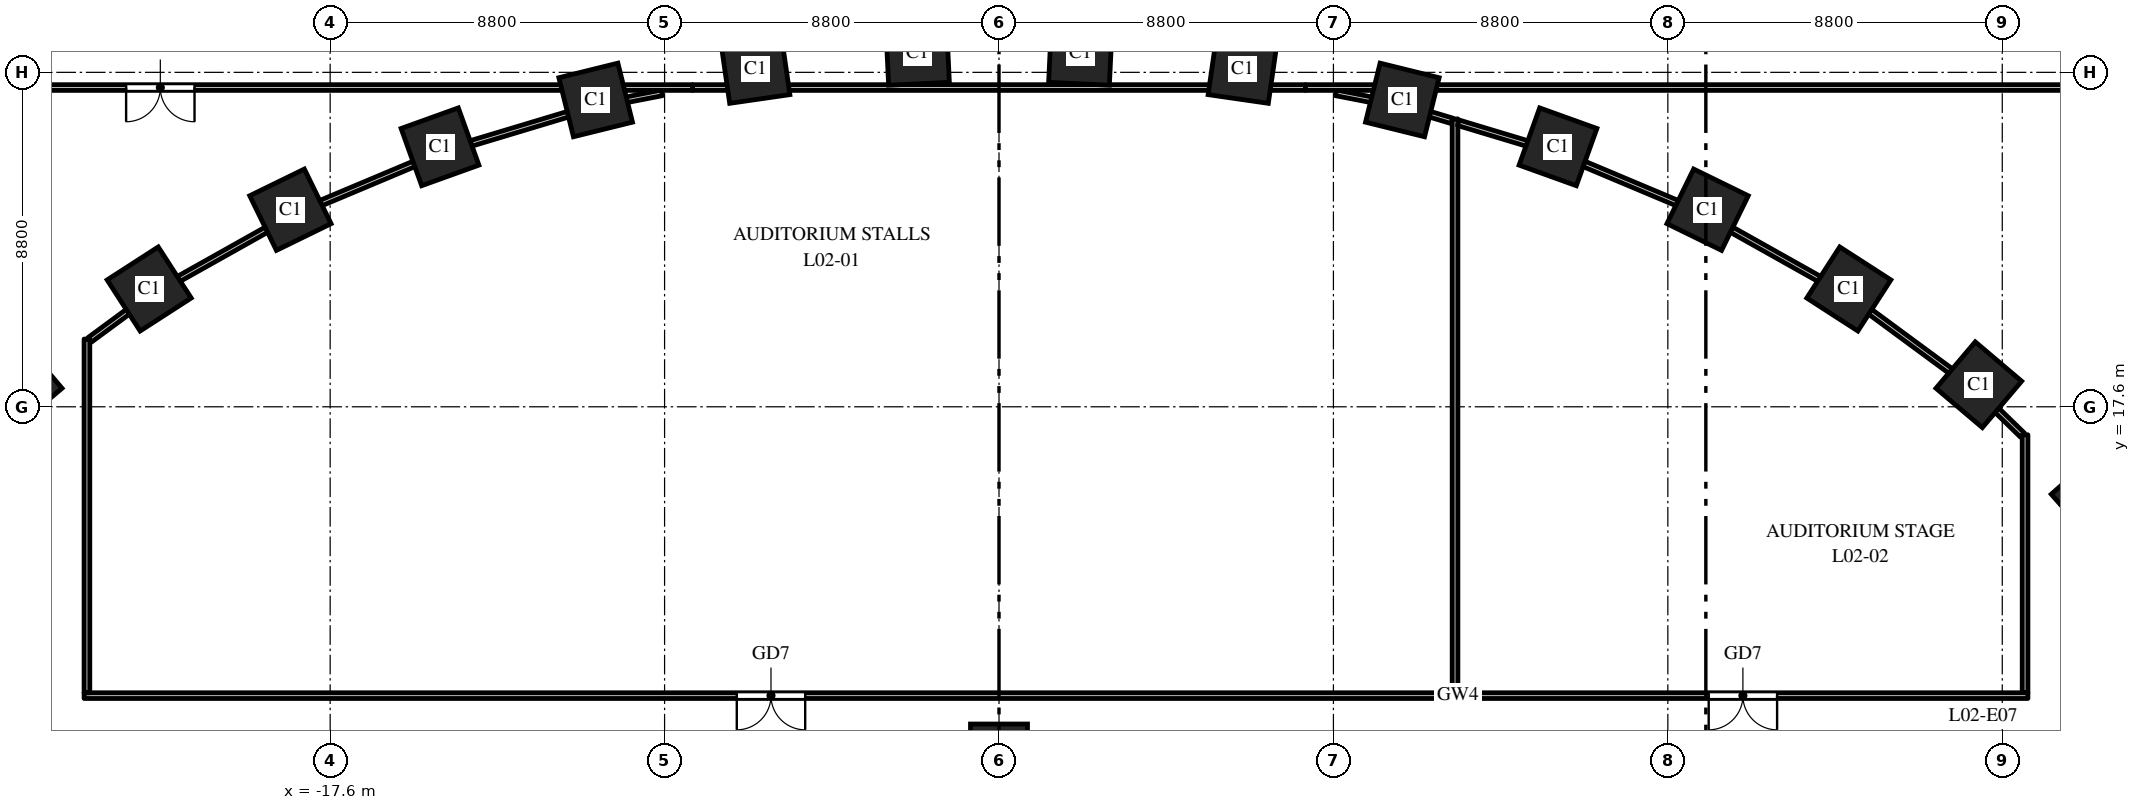
"""IFC4 building model, lengths in metres.
Left out: names, types, materials, properties, quantities, classifications, styles, units other than length and angle.
Written with IfcOpenShell. Run it as: python <this file> out.ifc"""

import sys

from ifc_helpers import new_model, si_unit, direction, frame, frame_2d, origin, origin_2d, place, context, subcontext, project, spatial, rectangle, extrude, element, fill, save


model = new_model("IFC4")
c1 = context("Model", 3, precision=1e-05, world=origin(), true_north=direction((0.0, 1.0)))
c2 = subcontext(c1, "Body", "Model", "MODEL_VIEW")
j1 = project(units=[si_unit("LENGTHUNIT", "METRE"), si_unit("PLANEANGLEUNIT", "RADIAN")], contexts=[c1])
p1 = place(None, origin())
s1 = spatial("IfcSite", under=j1, at=p1, CompositionType="ELEMENT")
p2 = place(p1, origin())
s2 = spatial("IfcBuilding", under=s1, at=p2, CompositionType="ELEMENT")
p3 = place(p2, frame((0.0, 0.0, 13.5)))
s3 = spatial("IfcBuildingStorey", under=s2, at=p3, CompositionType="ELEMENT", Elevation=13.5)
for number, where, z_axis, x_axis in (
    (1, (28.819, 15.23, 0.0), (0.0, 0.0, 1.0), (-0.663, 0.749, 0.0)),
    (2, (25.783, 18.18, 0.0), (0.0, 0.0, 1.0), (-0.763, 0.646, 0.0)),
    (3, (22.362, 20.7, 0.0), (0.0, 0.0, 1.0), (-0.84, 0.542, 0.0)),
    (4, (18.646, 22.785, 0.0), (0.0, 0.0, 1.0), (-0.898, 0.439, 0.0)),
    (5, (14.709, 24.441, 0.0), (0.0, 0.0, 1.0), (-0.941, 0.338, 0.0)),
    (6, (10.613, 25.674, 0.0), (0.0, 0.0, 1.0), (-0.971, 0.24, 0.0)),
    (7, (6.409, 26.491, 0.0), (0.0, 0.0, 1.0), (-0.99, 0.143, 0.0)),
    (8, (2.143, 26.898, 0.0), (0.0, 0.0, 1.0), (-0.999, 0.048, 0.0)),
    (9, (-2.143, 26.898, 0.0), (0.0, 0.0, 1.0), (-0.999, -0.048, 0.0)),
    (10, (-6.409, 26.491, 0.0), (0.0, 0.0, 1.0), (-0.99, -0.143, 0.0)),
    (11, (-10.613, 25.674, 0.0), (0.0, 0.0, 1.0), (-0.971, -0.24, 0.0)),
    (12, (-14.709, 24.441, 0.0), (0.0, 0.0, 1.0), (-0.941, -0.338, 0.0)),
    (13, (-18.646, 22.785, 0.0), (0.0, 0.0, 1.0), (-0.898, -0.439, 0.0)),
    (14, (-22.362, 20.7, 0.0), (0.0, 0.0, 1.0), (-0.84, -0.542, 0.0)),
    (15, (-25.783, 18.18, 0.0), (0.0, 0.0, 1.0), (-0.763, -0.646, 0.0)),
):
    element("IfcColumn", number, at=place(p3, frame(where, z_axis=z_axis, x_axis=x_axis)), inside=s3, PredefinedType="COLUMN", context=c2, shape_type="SweptSolid", body=[
        extrude(rectangle(XDim=1.6, YDim=1.6, at=origin_2d()), origin(), (0.0, 0.0, 1.0), 6.0),
    ])
p4 = place(p3, frame((0.0, 8.503, 0.0), z_axis=(0.0, 0.0, 1.0), x_axis=(-1.0, 0.0, 0.0)))
e16 = element("IfcColumn", 16, at=p4, inside=s3, PredefinedType="COLUMN", context=c2, shape_type="SweptSolid", body=[
    extrude(rectangle(XDim=1.5, YDim=1.5, at=origin_2d()), origin(), (0.0, 0.0, 1.0), 6.0),
])
p5 = place(p3, frame((12.0, 25.175, 0.0), z_axis=(0.0, 0.0, 1.0), x_axis=(0.0, -1.0, 0.0)))
e17 = element("IfcWall", 17, at=p5, inside=s3, PredefinedType="PARTITIONING", context=c2, shape_type="SweptSolid", body=[
    extrude(rectangle(XDim=15.1, YDim=0.15, at=frame_2d((7.55, 0.0))), origin(), (0.0, 0.0, 1.0), 4.8),
])
p6 = place(p3, frame((-8.064, 26.0, 0.0), z_axis=(0.0, 0.0, 1.0), x_axis=(1.0, 0.0, 0.0)))
e18 = element("IfcWall", 18, at=p6, inside=s3, PredefinedType="PARTITIONING", context=c2, shape_type="SweptSolid", body=[
    extrude(rectangle(XDim=16.129, YDim=0.15, at=frame_2d((8.064, 0.0))), origin(), (0.0, 0.0, 1.0), 4.8),
])
p7 = place(p3, frame((-23.927, 19.361, 0.0), z_axis=(0.0, 0.0, 1.0), x_axis=(0.805121312462, 0.593110168703, 0.0)))
e19 = element("IfcWall", 19, at=p7, inside=s3, PredefinedType="PARTITIONING", context=c2, shape_type="SweptSolid", body=[
    extrude(rectangle(XDim=1.968, YDim=0.15, at=frame_2d((0.984, 0.0))), origin(), (0.0, 0.0, 1.0), 4.85),
])
p8 = place(p3, frame((-22.346, 20.537, 0.0), z_axis=(0.0, 0.0, 1.0), x_axis=(0.872066959566, 0.489386573204, 0.0)))
e20 = element("IfcWall", 20, at=p8, inside=s3, PredefinedType="PARTITIONING", context=c2, shape_type="SweptSolid", body=[
    extrude(rectangle(XDim=4.242, YDim=0.15, at=frame_2d((2.121, 0.0))), origin(), (0.0, 0.0, 1.0), 4.85),
])
p9 = place(p3, frame((-18.649, 22.621, 0.0), z_axis=(0.0, 0.0, 1.0), x_axis=(0.921813560734, 0.387633537309, 0.0)))
e21 = element("IfcWall", 21, at=p9, inside=s3, PredefinedType="PARTITIONING", context=c2, shape_type="SweptSolid", body=[
    extrude(rectangle(XDim=4.253, YDim=0.15, at=frame_2d((2.126, 0.0))), origin(), (0.0, 0.0, 1.0), 4.85),
])
p10 = place(p3, frame((-14.73, 24.278, 0.0), z_axis=(0.0, 0.0, 1.0), x_axis=(0.957579221601, 0.288170148278, 0.0)))
e22 = element("IfcWall", 22, at=p10, inside=s3, PredefinedType="PARTITIONING", context=c2, shape_type="SweptSolid", body=[
    extrude(rectangle(XDim=4.412, YDim=0.15, at=frame_2d((2.206, 0.0))), origin(), (0.0, 0.0, 1.0), 4.85),
])
p11 = place(p3, frame((-10.503, 25.542, 0.0), z_axis=(0.0, 0.0, 1.0), x_axis=(0.981604703618, 0.190924607725, 0.0)))
e23 = element("IfcWall", 23, at=p11, inside=s3, PredefinedType="PARTITIONING", context=c2, shape_type="SweptSolid", body=[
    extrude(rectangle(XDim=1.665, YDim=0.15, at=frame_2d((0.833, 0.0))), origin(), (0.0, 0.0, 1.0), 4.85),
])
p12 = place(p3, frame((8.868, 25.86, 0.0), z_axis=(0.0, 0.0, 1.0), x_axis=(0.981606292059, -0.190916440861, 0.0)))
e24 = element("IfcWall", 24, at=p12, inside=s3, PredefinedType="PARTITIONING", context=c2, shape_type="SweptSolid", body=[
    extrude(rectangle(XDim=1.816, YDim=0.15, at=frame_2d((0.908, 0.0))), origin(), (0.0, 0.0, 1.0), 4.85),
])
p13 = place(p3, frame((10.65, 25.506, 0.0), z_axis=(0.0, 0.0, 1.0), x_axis=(0.957547353506, -0.28827602362, 0.0)))
e25 = element("IfcWall", 25, at=p13, inside=s3, PredefinedType="PARTITIONING", context=c2, shape_type="SweptSolid", body=[
    extrude(rectangle(XDim=1.327, YDim=0.15, at=frame_2d((0.664, 0.0))), origin(), (0.0, 0.0, 1.0), 4.85),
])
p14 = place(p3, frame((12.075, 10.0, 0.0), z_axis=(0.0, 0.0, 1.0), x_axis=(-1.0, 0.0, 0.0)))
e26 = element("IfcWall", 26, at=p14, inside=s3, PredefinedType="PARTITIONING", context=c2, shape_type="SweptSolid", body=[
    extrude(rectangle(XDim=36.15, YDim=0.15, at=frame_2d((18.075, 0.0))), origin(), (0.0, 0.0, 1.0), 4.7),
])
p15 = place(p14, frame((17.175, 0.0, 0.0)))
e27 = element("IfcOpeningElement", 27, at=p15, cuts=e26, PredefinedType="OPENING", context=c2, shape_type="SweptSolid", body=[
    extrude(rectangle(XDim=1.8, YDim=2.4, at=frame_2d((0.9, 1.2))), frame((0.0, 0.085, 0.0), z_axis=(0.0, -1.0, 0.0), x_axis=(1.0, 0.0, 0.0)), (0.0, 0.0, 1.0), 0.17),
])
p16 = place(p3, frame((-24.0, 10.075, 0.0), z_axis=(0.0, 0.0, 1.0), x_axis=(0.0, 1.0, 0.0)))
e28 = element("IfcWall", 28, at=p16, inside=s3, PredefinedType="PARTITIONING", context=c2, shape_type="SweptSolid", body=[
    extrude(rectangle(XDim=9.307, YDim=0.15, at=frame_2d((4.654, 0.0))), origin(), (0.0, 0.0, 1.0), 4.7),
])
p17 = place(p3, frame((12.086, 25.074, 0.0), z_axis=(0.0, 0.0, 1.0), x_axis=(0.957560758584, -0.28823149311, 0.0)))
e29 = element("IfcWall", 29, at=p17, inside=s3, PredefinedType="PARTITIONING", context=c2, shape_type="SweptSolid", body=[
    extrude(rectangle(XDim=2.611, YDim=0.15, at=frame_2d((1.305, 0.0))), origin(), (0.0, 0.0, 1.0), 4.85),
])
p18 = place(p3, frame((14.59, 24.329, 0.0), z_axis=(0.0, 0.0, 1.0), x_axis=(0.921807455064, -0.387648056604, 0.0)))
e30 = element("IfcWall", 30, at=p18, inside=s3, PredefinedType="PARTITIONING", context=c2, shape_type="SweptSolid", body=[
    extrude(rectangle(XDim=4.404, YDim=0.15, at=frame_2d((2.202, 0.0))), origin(), (0.0, 0.0, 1.0), 4.85),
])
p19 = place(p3, frame((18.647, 22.613, 0.0), z_axis=(0.0, 0.0, 1.0), x_axis=(0.872066959566, -0.489386573204, 0.0)))
e31 = element("IfcWall", 31, at=p19, inside=s3, PredefinedType="PARTITIONING", context=c2, shape_type="SweptSolid", body=[
    extrude(rectangle(XDim=4.242, YDim=0.15, at=frame_2d((2.121, 0.0))), origin(), (0.0, 0.0, 1.0), 4.85),
])
p20 = place(p3, frame((22.342, 20.528, 0.0), z_axis=(0.0, 0.0, 1.0), x_axis=(0.80511970197, -0.59311235487, 0.0)))
e32 = element("IfcWall", 32, at=p20, inside=s3, PredefinedType="PARTITIONING", context=c2, shape_type="SweptSolid", body=[
    extrude(rectangle(XDim=4.227, YDim=0.15, at=frame_2d((2.114, 0.0))), origin(), (0.0, 0.0, 1.0), 4.85),
])
p21 = place(p3, frame((25.741, 18.012, 0.0), z_axis=(0.0, 0.0, 1.0), x_axis=(0.717304526637, -0.696759797969, 0.0)))
e33 = element("IfcWall", 33, at=p21, inside=s3, PredefinedType="PARTITIONING", context=c2, shape_type="SweptSolid", body=[
    extrude(rectangle(XDim=1.664, YDim=0.15, at=frame_2d((0.832, 0.0))), origin(), (0.0, 0.0, 1.0), 4.85),
])
p22 = place(p3, frame((27.0, 16.864, 0.0), z_axis=(0.0, 0.0, 1.0), x_axis=(0.0, -1.0, 0.0)))
e34 = element("IfcWall", 34, at=p22, inside=s3, PredefinedType="PARTITIONING", context=c2, shape_type="SweptSolid", body=[
    extrude(rectangle(XDim=6.789, YDim=0.15, at=frame_2d((3.394, 0.0))), origin(), (0.0, 0.0, 1.0), 4.7),
])
p23 = place(p3, frame((27.075, 10.0, 0.0), z_axis=(0.0, 0.0, 1.0), x_axis=(-1.0, 0.0, 0.0)))
e35 = element("IfcWall", 35, at=p23, inside=s3, PredefinedType="PARTITIONING", context=c2, shape_type="SweptSolid", body=[
    extrude(rectangle(XDim=15.0, YDim=0.15, at=frame_2d((7.5, 0.0))), origin(), (0.0, 0.0, 1.0), 4.7),
])
p24 = place(p23, frame((6.6, 0.0, 0.0)))
e36 = element("IfcOpeningElement", 36, at=p24, cuts=e35, PredefinedType="OPENING", context=c2, shape_type="SweptSolid", body=[
    extrude(rectangle(XDim=1.8, YDim=2.4, at=frame_2d((0.9, 1.2))), frame((0.0, 0.085, 0.0), z_axis=(0.0, -1.0, 0.0), x_axis=(1.0, 0.0, 0.0)), (0.0, 0.0, 1.0), 0.17),
])
p25 = place(p3, frame((34.075, 26.0, 0.0), z_axis=(0.0, 0.0, 1.0), x_axis=(-1.0, 0.0, 0.0)))
e37 = element("IfcWall", 37, at=p25, inside=s3, PredefinedType="PARTITIONING", context=c2, shape_type="SweptSolid", body=[
    extrude(rectangle(XDim=26.012, YDim=0.15, at=frame_2d((13.006, 0.0))), origin(), (0.0, 0.0, 1.0), 4.75),
])
p26 = place(p3, frame((-8.063, 26.0, 0.0), z_axis=(0.0, 0.0, 1.0), x_axis=(-1.0, 0.0, 0.0)))
e38 = element("IfcWall", 38, at=p26, inside=s3, PredefinedType="PARTITIONING", context=c2, shape_type="SweptSolid", body=[
    extrude(rectangle(XDim=28.012, YDim=0.15, at=frame_2d((14.006, 0.0))), origin(), (0.0, 0.0, 1.0), 4.75),
])
p27 = place(p26, frame((13.106, 0.0, 0.0)))
e39 = element("IfcOpeningElement", 39, at=p27, cuts=e38, PredefinedType="OPENING", context=c2, shape_type="SweptSolid", body=[
    extrude(rectangle(XDim=1.8, YDim=2.4, at=frame_2d((0.9, 1.2))), frame((0.0, 0.085, 0.0), z_axis=(0.0, -1.0, 0.0), x_axis=(1.0, 0.0, 0.0)), (0.0, 0.0, 1.0), 0.17),
])
p28 = place(p15, origin())
e40 = element("IfcDoor", 40, at=p28, inside=s3, OperationType="DOUBLE_DOOR_SINGLE_SWING", PredefinedType="DOOR", context=c2, shape_type="SweptSolid", body=[
    extrude(rectangle(XDim=1.8, YDim=2.4, at=frame_2d((0.9, 1.2))), frame((0.0, 0.025, 0.0), z_axis=(0.0, -1.0, 0.0), x_axis=(1.0, 0.0, 0.0)), (0.0, 0.0, 1.0), 0.05),
])
fill(e27, e40)
p29 = place(p24, origin())
e41 = element("IfcDoor", 41, at=p29, inside=s3, OperationType="DOUBLE_DOOR_SINGLE_SWING", PredefinedType="DOOR", context=c2, shape_type="SweptSolid", body=[
    extrude(rectangle(XDim=1.8, YDim=2.4, at=frame_2d((0.9, 1.2))), frame((0.0, 0.025, 0.0), z_axis=(0.0, -1.0, 0.0), x_axis=(1.0, 0.0, 0.0)), (0.0, 0.0, 1.0), 0.05),
])
fill(e36, e41)
p30 = place(p27, origin())
e42 = element("IfcDoor", 42, at=p30, inside=s3, OperationType="DOUBLE_DOOR_SINGLE_SWING", PredefinedType="DOOR", context=c2, shape_type="SweptSolid", body=[
    extrude(rectangle(XDim=1.8, YDim=2.4, at=frame_2d((0.9, 1.2))), frame((0.0, 0.025, 0.0), z_axis=(0.0, -1.0, 0.0), x_axis=(1.0, 0.0, 0.0)), (0.0, 0.0, 1.0), 0.05),
])
fill(e39, e42)
save(model, sys.argv[1])
